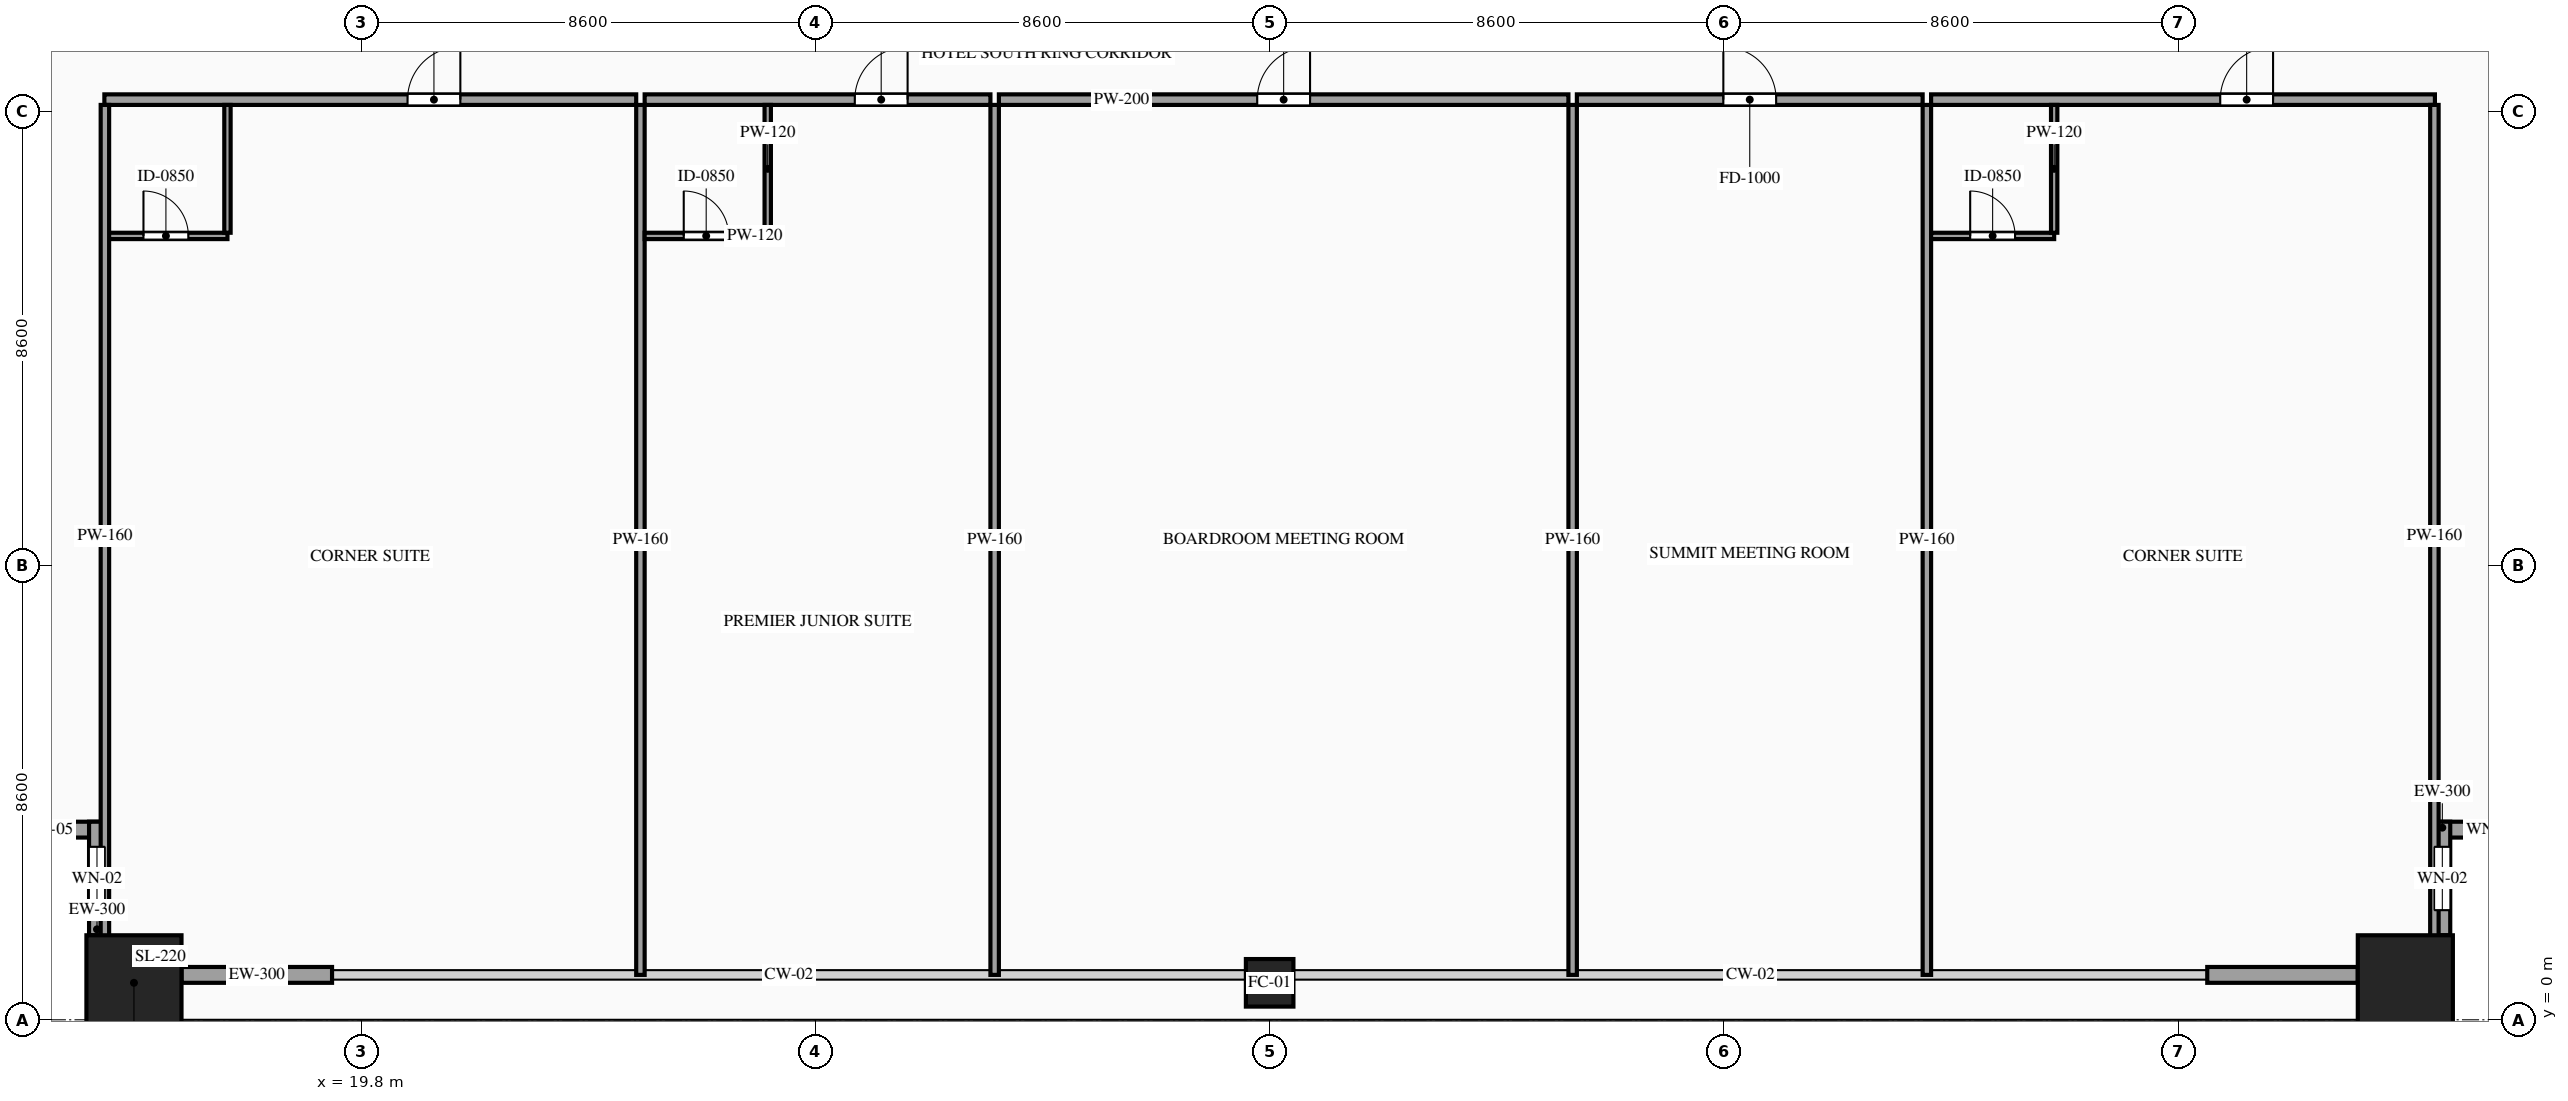
"""IFC4 building model, lengths in metres.
Left out: names, types, materials, properties, quantities, classifications, styles, units other than length and angle.
Written with IfcOpenShell. Run it as: python <this file> out.ifc"""

import sys

from ifc_helpers import new_model, si_unit, direction, frame, frame_2d, origin, origin_2d, place, context, subcontext, project, spatial, rectangle, hollow_rectangle, extrude, source, transform, mapped, element, fill, save


model = new_model("IFC4")
c1 = context("Model", 3, precision=1e-05, world=origin(), true_north=direction((0.0, 1.0)))
c2 = subcontext(c1, "Body", "Model", "MODEL_VIEW")
j1 = project(units=[si_unit("LENGTHUNIT", "METRE"), si_unit("PLANEANGLEUNIT", "RADIAN")], contexts=[c1])
p1 = place(None, origin())
s1 = spatial("IfcSite", under=j1, at=p1, CompositionType="ELEMENT")
p2 = place(p1, origin())
s2 = spatial("IfcBuilding", under=s1, at=p2, CompositionType="ELEMENT")
p3 = place(p2, frame((0.0, 0.0, 53.2)))
s3 = spatial("IfcBuildingStorey", under=s2, at=p3, CompositionType="ELEMENT", Elevation=53.2)
m1 = source(origin(), c2, "Body", "SweptSolid", [
    extrude(hollow_rectangle(XDim=1.8, YDim=1.8, WallThickness=0.08, at=origin_2d()), origin(), (0.0, 0.0, 1.0), 3.6),
])
p4 = place(p3, frame((15.5, 0.7, 0.0), z_axis=(0.0, 0.0, 1.0), x_axis=(1.0, 0.0, 0.0)))
e1 = element("IfcColumn", 1, at=p4, inside=s3, PredefinedType="COLUMN", context=c2, shape_type="MappedRepresentation", body=[
    mapped(m1, transform((0.0, 0.0, 0.0), scale=1.0)),
])
m2 = source(origin(), c2, "Body", "SweptSolid", [
    extrude(hollow_rectangle(XDim=0.9, YDim=0.9, WallThickness=0.042, at=origin_2d()), origin(), (0.0, 0.0, 1.0), 3.6),
])
p5 = place(p3, frame((37.0, 0.7, 0.0), z_axis=(0.0, 0.0, 1.0), x_axis=(1.0, 0.0, 0.0)))
e2 = element("IfcColumn", 2, at=p5, inside=s3, PredefinedType="COLUMN", context=c2, shape_type="MappedRepresentation", body=[
    mapped(m2, transform((0.0, 0.0, 0.0), scale=1.0)),
])
p6 = place(p3, frame((58.5, 0.7, 0.0), z_axis=(0.0, 0.0, 1.0), x_axis=(1.0, 0.0, 0.0)))
e3 = element("IfcColumn", 3, at=p6, inside=s3, PredefinedType="COLUMN", context=c2, shape_type="MappedRepresentation", body=[
    mapped(m1, transform((0.0, 0.0, 0.0), scale=1.0)),
])
p7 = place(p3, frame((12.8, 3.6, 0.0), z_axis=(0.0, 0.0, 1.0), x_axis=(1.0, 0.0, 0.0)))
e4 = element("IfcWall", 4, at=p7, inside=s3, PredefinedType="SOLIDWALL", context=c2, shape_type="SweptSolid", body=[
    extrude(rectangle(XDim=2.15, YDim=0.3, at=frame_2d((1.075, 0.0))), origin(), (0.0, 0.0, 1.0), 3.38),
])
p8 = place(p7, frame((0.625, 0.0, 0.85)))
e5 = element("IfcOpeningElement", 5, at=p8, cuts=e4, PredefinedType="OPENING", context=c2, shape_type="SweptSolid", body=[
    extrude(rectangle(XDim=0.9, YDim=1.5, at=frame_2d((0.45, 0.75))), frame((0.0, 0.165, 0.0), z_axis=(0.0, -1.0, 0.0), x_axis=(1.0, 0.0, 0.0)), (0.0, 0.0, 1.0), 0.33),
])
p9 = place(p3, frame((14.8, 3.75, 0.0), z_axis=(0.0, 0.0, 1.0), x_axis=(0.0, -1.0, 0.0)))
e6 = element("IfcWall", 6, at=p9, inside=s3, PredefinedType="SOLIDWALL", context=c2, shape_type="SweptSolid", body=[
    extrude(rectangle(XDim=2.15, YDim=0.3, at=frame_2d((1.075, 0.0))), origin(), (0.0, 0.0, 1.0), 3.38),
])
p10 = place(p9, frame((0.475, 0.0, 0.85)))
e7 = element("IfcOpeningElement", 7, at=p10, cuts=e6, PredefinedType="OPENING", context=c2, shape_type="SweptSolid", body=[
    extrude(rectangle(XDim=1.2, YDim=2.1, at=frame_2d((0.6, 1.05))), frame((0.0, 0.165, 0.0), z_axis=(0.0, -1.0, 0.0), x_axis=(1.0, 0.0, 0.0)), (0.0, 0.0, 1.0), 0.33),
])
p11 = place(p3, frame((59.05, 3.6, 0.0), z_axis=(0.0, 0.0, 1.0), x_axis=(1.0, 0.0, 0.0)))
e8 = element("IfcWall", 8, at=p11, inside=s3, PredefinedType="SOLIDWALL", context=c2, shape_type="SweptSolid", body=[
    extrude(rectangle(XDim=2.15, YDim=0.3, at=frame_2d((1.075, 0.0))), origin(), (0.0, 0.0, 1.0), 3.38),
])
p12 = place(p11, frame((0.625, 0.0, 0.85)))
e9 = element("IfcOpeningElement", 9, at=p12, cuts=e8, PredefinedType="OPENING", context=c2, shape_type="SweptSolid", body=[
    extrude(rectangle(XDim=0.9, YDim=1.5, at=frame_2d((0.45, 0.75))), frame((0.0, 0.165, 0.0), z_axis=(0.0, -1.0, 0.0), x_axis=(1.0, 0.0, 0.0)), (0.0, 0.0, 1.0), 0.33),
])
p13 = place(p3, frame((59.2, 1.6, 0.0), z_axis=(0.0, 0.0, 1.0), x_axis=(0.0, 1.0, 0.0)))
e10 = element("IfcWall", 10, at=p13, inside=s3, PredefinedType="SOLIDWALL", context=c2, shape_type="SweptSolid", body=[
    extrude(rectangle(XDim=2.15, YDim=0.3, at=frame_2d((1.075, 0.0))), origin(), (0.0, 0.0, 1.0), 3.38),
])
p14 = place(p13, frame((0.475, 0.0, 0.85)))
e11 = element("IfcOpeningElement", 11, at=p14, cuts=e10, PredefinedType="OPENING", context=c2, shape_type="SweptSolid", body=[
    extrude(rectangle(XDim=1.2, YDim=2.1, at=frame_2d((0.6, 1.05))), frame((0.0, 0.165, 0.0), z_axis=(0.0, -1.0, 0.0), x_axis=(1.0, 0.0, 0.0)), (0.0, 0.0, 1.0), 0.33),
])
m3 = source(origin(), c2, "Body", "SweptSolid", [
    extrude(rectangle(XDim=2.85, YDim=0.3, at=frame_2d((1.425, 0.0))), origin(), (0.0, 0.0, 1.0), 2.775),
])
for number, where, z_axis, x_axis in (
    (12, (16.4, 0.85, 0.0), (0.0, 0.0, 1.0), (1.0, 0.0, 0.0)),
    (13, (54.75, 0.85, 0.0), (0.0, 0.0, 1.0), (1.0, 0.0, 0.0)),
):
    element("IfcWall", number, at=place(p3, frame(where, z_axis=z_axis, x_axis=x_axis)), inside=s3, PredefinedType="SOLIDWALL", context=c2, shape_type="MappedRepresentation", body=[
        mapped(m3, transform((0.0, 0.0, 0.0), scale=1.0)),
    ])
p15 = place(p3, frame((14.94, 17.42, 0.0), z_axis=(0.0, 0.0, 1.0), x_axis=(1.0, 0.0, 0.0)))
e14 = element("IfcWall", 14, at=p15, inside=s3, PredefinedType="PARTITIONING", context=c2, shape_type="SweptSolid", body=[
    extrude(rectangle(XDim=10.068, YDim=0.2, at=frame_2d((5.034, 0.0))), origin(), (0.0, 0.0, 1.0), 3.38),
])
p16 = place(p15, frame((5.739, 0.0, 0.0)))
e15 = element("IfcOpeningElement", 15, at=p16, cuts=e14, PredefinedType="OPENING", context=c2, shape_type="SweptSolid", body=[
    extrude(rectangle(XDim=1.0, YDim=2.2, at=frame_2d((0.5, 1.1))), frame((0.0, 0.115, 0.0), z_axis=(0.0, -1.0, 0.0), x_axis=(1.0, 0.0, 0.0)), (0.0, 0.0, 1.0), 0.23),
])
m4 = source(origin(), c2, "Body", "SweptSolid", [
    extrude(rectangle(XDim=16.47, YDim=0.16, at=frame_2d((8.235, 0.0))), origin(), (0.0, 0.0, 1.0), 3.38),
])
p17 = place(p3, frame((25.088, 0.85, 0.0), z_axis=(0.0, 0.0, 1.0), x_axis=(0.0, 1.0, 0.0)))
e16 = element("IfcWall", 16, at=p17, inside=s3, PredefinedType="PARTITIONING", context=c2, shape_type="MappedRepresentation", body=[
    mapped(m4, transform((0.0, 0.0, 0.0), scale=1.0)),
])
p18 = place(p3, frame((14.94, 14.84, 0.0), z_axis=(0.0, 0.0, 1.0), x_axis=(1.0, 0.0, 0.0)))
e17 = element("IfcWall", 17, at=p18, inside=s3, PredefinedType="PARTITIONING", context=c2, shape_type="SweptSolid", body=[
    extrude(rectangle(XDim=2.33, YDim=0.12, at=frame_2d((1.165, 0.0))), origin(), (0.0, 0.0, 1.0), 3.38),
])
p19 = place(p18, frame((0.74, 0.0, 0.0)))
e18 = element("IfcOpeningElement", 18, at=p19, cuts=e17, PredefinedType="OPENING", context=c2, shape_type="SweptSolid", body=[
    extrude(rectangle(XDim=0.85, YDim=2.1, at=frame_2d((0.425, 1.05))), frame((0.0, 0.075, 0.0), z_axis=(0.0, -1.0, 0.0), x_axis=(1.0, 0.0, 0.0)), (0.0, 0.0, 1.0), 0.15),
])
m5 = source(origin(), c2, "Body", "SweptSolid", [
    extrude(rectangle(XDim=2.42, YDim=0.12, at=frame_2d((1.21, 0.0))), origin(), (0.0, 0.0, 1.0), 3.38),
])
p20 = place(p3, frame((17.27, 14.9, 0.0), z_axis=(0.0, 0.0, 1.0), x_axis=(0.0, 1.0, 0.0)))
e19 = element("IfcWall", 19, at=p20, inside=s3, PredefinedType="PARTITIONING", context=c2, shape_type="MappedRepresentation", body=[
    mapped(m5, transform((0.0, 0.0, 0.0), scale=1.0)),
])
p21 = place(p3, frame((25.168, 17.42, 0.0), z_axis=(0.0, 0.0, 1.0), x_axis=(1.0, 0.0, 0.0)))
e20 = element("IfcWall", 20, at=p21, inside=s3, PredefinedType="PARTITIONING", context=c2, shape_type="SweptSolid", body=[
    extrude(rectangle(XDim=6.546, YDim=0.2, at=frame_2d((3.273, 0.0))), origin(), (0.0, 0.0, 1.0), 3.38),
])
p22 = place(p21, frame((3.978, 0.0, 0.0)))
e21 = element("IfcOpeningElement", 21, at=p22, cuts=e20, PredefinedType="OPENING", context=c2, shape_type="SweptSolid", body=[
    extrude(rectangle(XDim=1.0, YDim=2.2, at=frame_2d((0.5, 1.1))), frame((0.0, 0.115, 0.0), z_axis=(0.0, -1.0, 0.0), x_axis=(1.0, 0.0, 0.0)), (0.0, 0.0, 1.0), 0.23),
])
p23 = place(p3, frame((31.794, 0.85, 0.0), z_axis=(0.0, 0.0, 1.0), x_axis=(0.0, 1.0, 0.0)))
e22 = element("IfcWall", 22, at=p23, inside=s3, PredefinedType="PARTITIONING", context=c2, shape_type="MappedRepresentation", body=[
    mapped(m4, transform((0.0, 0.0, 0.0), scale=1.0)),
])
p24 = place(p3, frame((25.168, 14.84, 0.0), z_axis=(0.0, 0.0, 1.0), x_axis=(1.0, 0.0, 0.0)))
e23 = element("IfcWall", 23, at=p24, inside=s3, PredefinedType="PARTITIONING", context=c2, shape_type="SweptSolid", body=[
    extrude(rectangle(XDim=2.33, YDim=0.12, at=frame_2d((1.165, 0.0))), origin(), (0.0, 0.0, 1.0), 3.38),
])
p25 = place(p24, frame((0.74, 0.0, 0.0)))
e24 = element("IfcOpeningElement", 24, at=p25, cuts=e23, PredefinedType="OPENING", context=c2, shape_type="SweptSolid", body=[
    extrude(rectangle(XDim=0.85, YDim=2.1, at=frame_2d((0.425, 1.05))), frame((0.0, 0.075, 0.0), z_axis=(0.0, -1.0, 0.0), x_axis=(1.0, 0.0, 0.0)), (0.0, 0.0, 1.0), 0.15),
])
p26 = place(p3, frame((27.498, 14.9, 0.0), z_axis=(0.0, 0.0, 1.0), x_axis=(0.0, 1.0, 0.0)))
e25 = element("IfcWall", 25, at=p26, inside=s3, PredefinedType="PARTITIONING", context=c2, shape_type="MappedRepresentation", body=[
    mapped(m5, transform((0.0, 0.0, 0.0), scale=1.0)),
])
p27 = place(p3, frame((31.874, 17.42, 0.0), z_axis=(0.0, 0.0, 1.0), x_axis=(1.0, 0.0, 0.0)))
e26 = element("IfcWall", 26, at=p27, inside=s3, PredefinedType="PARTITIONING", context=c2, shape_type="SweptSolid", body=[
    extrude(rectangle(XDim=10.782, YDim=0.2, at=frame_2d((5.391, 0.0))), origin(), (0.0, 0.0, 1.0), 3.38),
])
p28 = place(p27, frame((4.891, 0.0, 0.0)))
e27 = element("IfcOpeningElement", 27, at=p28, cuts=e26, PredefinedType="OPENING", context=c2, shape_type="SweptSolid", body=[
    extrude(rectangle(XDim=1.0, YDim=2.2, at=frame_2d((0.5, 1.1))), frame((0.0, 0.115, 0.0), z_axis=(0.0, -1.0, 0.0), x_axis=(1.0, 0.0, 0.0)), (0.0, 0.0, 1.0), 0.23),
])
p29 = place(p3, frame((42.736, 0.85, 0.0), z_axis=(0.0, 0.0, 1.0), x_axis=(0.0, 1.0, 0.0)))
e28 = element("IfcWall", 28, at=p29, inside=s3, PredefinedType="PARTITIONING", context=c2, shape_type="MappedRepresentation", body=[
    mapped(m4, transform((0.0, 0.0, 0.0), scale=1.0)),
])
p30 = place(p3, frame((42.816, 17.42, 0.0), z_axis=(0.0, 0.0, 1.0), x_axis=(1.0, 0.0, 0.0)))
e29 = element("IfcWall", 29, at=p30, inside=s3, PredefinedType="PARTITIONING", context=c2, shape_type="SweptSolid", body=[
    extrude(rectangle(XDim=6.546, YDim=0.2, at=frame_2d((3.273, 0.0))), origin(), (0.0, 0.0, 1.0), 3.38),
])
p31 = place(p30, frame((2.773, 0.0, 0.0)))
e30 = element("IfcOpeningElement", 30, at=p31, cuts=e29, PredefinedType="OPENING", context=c2, shape_type="SweptSolid", body=[
    extrude(rectangle(XDim=1.0, YDim=2.2, at=frame_2d((0.5, 1.1))), frame((0.0, 0.115, 0.0), z_axis=(0.0, -1.0, 0.0), x_axis=(1.0, 0.0, 0.0)), (0.0, 0.0, 1.0), 0.23),
])
p32 = place(p3, frame((49.442, 0.85, 0.0), z_axis=(0.0, 0.0, 1.0), x_axis=(0.0, 1.0, 0.0)))
e31 = element("IfcWall", 31, at=p32, inside=s3, PredefinedType="PARTITIONING", context=c2, shape_type="MappedRepresentation", body=[
    mapped(m4, transform((0.0, 0.0, 0.0), scale=1.0)),
])
p33 = place(p3, frame((49.522, 17.42, 0.0), z_axis=(0.0, 0.0, 1.0), x_axis=(1.0, 0.0, 0.0)))
e32 = element("IfcWall", 32, at=p33, inside=s3, PredefinedType="PARTITIONING", context=c2, shape_type="SweptSolid", body=[
    extrude(rectangle(XDim=9.538, YDim=0.2, at=frame_2d((4.769, 0.0))), origin(), (0.0, 0.0, 1.0), 3.38),
])
p34 = place(p33, frame((5.474, 0.0, 0.0)))
e33 = element("IfcOpeningElement", 33, at=p34, cuts=e32, PredefinedType="OPENING", context=c2, shape_type="SweptSolid", body=[
    extrude(rectangle(XDim=1.0, YDim=2.2, at=frame_2d((0.5, 1.1))), frame((0.0, 0.115, 0.0), z_axis=(0.0, -1.0, 0.0), x_axis=(1.0, 0.0, 0.0)), (0.0, 0.0, 1.0), 0.23),
])
m6 = source(origin(), c2, "Body", "SweptSolid", [
    extrude(rectangle(XDim=16.32, YDim=0.16, at=frame_2d((8.16, 0.0))), origin(), (0.0, 0.0, 1.0), 3.38),
])
for number, where, z_axis, x_axis in (
    (34, (14.95, 1.0, 0.0), (0.0, 0.0, 1.0), (0.0, 1.0, 0.0)),
    (35, (59.05, 1.0, 0.0), (0.0, 0.0, 1.0), (0.0, 1.0, 0.0)),
):
    element("IfcWall", number, at=place(p3, frame(where, z_axis=z_axis, x_axis=x_axis)), inside=s3, PredefinedType="PARTITIONING", context=c2, shape_type="MappedRepresentation", body=[
        mapped(m6, transform((0.0, 0.0, 0.0), scale=1.0)),
    ])
p35 = place(p3, frame((49.522, 14.84, 0.0), z_axis=(0.0, 0.0, 1.0), x_axis=(1.0, 0.0, 0.0)))
e36 = element("IfcWall", 36, at=p35, inside=s3, PredefinedType="PARTITIONING", context=c2, shape_type="SweptSolid", body=[
    extrude(rectangle(XDim=2.33, YDim=0.12, at=frame_2d((1.165, 0.0))), origin(), (0.0, 0.0, 1.0), 3.38),
])
p36 = place(p35, frame((0.74, 0.0, 0.0)))
e37 = element("IfcOpeningElement", 37, at=p36, cuts=e36, PredefinedType="OPENING", context=c2, shape_type="SweptSolid", body=[
    extrude(rectangle(XDim=0.85, YDim=2.1, at=frame_2d((0.425, 1.05))), frame((0.0, 0.075, 0.0), z_axis=(0.0, -1.0, 0.0), x_axis=(1.0, 0.0, 0.0)), (0.0, 0.0, 1.0), 0.15),
])
p37 = place(p3, frame((51.852, 14.9, 0.0), z_axis=(0.0, 0.0, 1.0), x_axis=(0.0, 1.0, 0.0)))
e38 = element("IfcWall", 38, at=p37, inside=s3, PredefinedType="PARTITIONING", context=c2, shape_type="MappedRepresentation", body=[
    mapped(m5, transform((0.0, 0.0, 0.0), scale=1.0)),
])
m7 = source(origin(), c2, "Body", "SweptSolid", [
    extrude(rectangle(XDim=0.9, YDim=1.5, at=frame_2d((0.45, 0.75))), frame((0.0, 0.03, 0.0), z_axis=(0.0, -1.0, 0.0), x_axis=(1.0, 0.0, 0.0)), (0.0, 0.0, 1.0), 0.06),
])
p38 = place(p8, origin())
e39 = element("IfcWindow", 39, at=p38, inside=s3, PartitioningType="SINGLE_PANEL", PredefinedType="WINDOW", context=c2, shape_type="MappedRepresentation", body=[
    mapped(m7, transform((0.0, 0.0, 0.0), scale=1.0)),
])
fill(e5, e39)
m8 = source(origin(), c2, "Body", "SweptSolid", [
    extrude(rectangle(XDim=1.2, YDim=2.1, at=frame_2d((0.6, 1.05))), frame((0.0, 0.03, 0.0), z_axis=(0.0, -1.0, 0.0), x_axis=(1.0, 0.0, 0.0)), (0.0, 0.0, 1.0), 0.06),
])
p39 = place(p10, origin())
e40 = element("IfcWindow", 40, at=p39, inside=s3, PartitioningType="SINGLE_PANEL", PredefinedType="WINDOW", context=c2, shape_type="MappedRepresentation", body=[
    mapped(m8, transform((0.0, 0.0, 0.0), scale=1.0)),
])
fill(e7, e40)
p40 = place(p12, origin())
e41 = element("IfcWindow", 41, at=p40, inside=s3, PartitioningType="SINGLE_PANEL", PredefinedType="WINDOW", context=c2, shape_type="MappedRepresentation", body=[
    mapped(m7, transform((0.0, 0.0, 0.0), scale=1.0)),
])
fill(e9, e41)
p41 = place(p14, origin())
e42 = element("IfcWindow", 42, at=p41, inside=s3, PartitioningType="SINGLE_PANEL", PredefinedType="WINDOW", context=c2, shape_type="MappedRepresentation", body=[
    mapped(m8, transform((0.0, 0.0, 0.0), scale=1.0)),
])
fill(e11, e42)
m9 = source(origin(), c2, "Body", "SweptSolid", [
    extrude(rectangle(XDim=1.0, YDim=2.2, at=frame_2d((0.5, 1.1))), frame((0.0, 0.025, 0.0), z_axis=(0.0, -1.0, 0.0), x_axis=(1.0, 0.0, 0.0)), (0.0, 0.0, 1.0), 0.05),
])
p42 = place(p16, origin())
e43 = element("IfcDoor", 43, at=p42, inside=s3, OperationType="SINGLE_SWING_RIGHT", PredefinedType="DOOR", context=c2, shape_type="MappedRepresentation", body=[
    mapped(m9, transform((0.0, 0.0, 0.0), scale=1.0)),
])
fill(e15, e43)
m10 = source(origin(), c2, "Body", "SweptSolid", [
    extrude(rectangle(XDim=0.85, YDim=2.1, at=frame_2d((0.425, 1.05))), frame((0.0, 0.025, 0.0), z_axis=(0.0, -1.0, 0.0), x_axis=(1.0, 0.0, 0.0)), (0.0, 0.0, 1.0), 0.05),
])
p43 = place(p19, origin())
e44 = element("IfcDoor", 44, at=p43, inside=s3, OperationType="SINGLE_SWING_LEFT", PredefinedType="DOOR", context=c2, shape_type="MappedRepresentation", body=[
    mapped(m10, transform((0.0, 0.0, 0.0), scale=1.0)),
])
fill(e18, e44)
p44 = place(p22, origin())
e45 = element("IfcDoor", 45, at=p44, inside=s3, OperationType="SINGLE_SWING_RIGHT", PredefinedType="DOOR", context=c2, shape_type="MappedRepresentation", body=[
    mapped(m9, transform((0.0, 0.0, 0.0), scale=1.0)),
])
fill(e21, e45)
p45 = place(p25, origin())
e46 = element("IfcDoor", 46, at=p45, inside=s3, OperationType="SINGLE_SWING_LEFT", PredefinedType="DOOR", context=c2, shape_type="MappedRepresentation", body=[
    mapped(m10, transform((0.0, 0.0, 0.0), scale=1.0)),
])
fill(e24, e46)
p46 = place(p28, origin())
e47 = element("IfcDoor", 47, at=p46, inside=s3, OperationType="SINGLE_SWING_RIGHT", PredefinedType="DOOR", context=c2, shape_type="MappedRepresentation", body=[
    mapped(m9, transform((0.0, 0.0, 0.0), scale=1.0)),
])
fill(e27, e47)
p47 = place(p31, origin())
e48 = element("IfcDoor", 48, at=p47, inside=s3, OperationType="SINGLE_SWING_LEFT", PredefinedType="DOOR", context=c2, shape_type="MappedRepresentation", body=[
    mapped(m9, transform((0.0, 0.0, 0.0), scale=1.0)),
])
fill(e30, e48)
p48 = place(p34, origin())
e49 = element("IfcDoor", 49, at=p48, inside=s3, OperationType="SINGLE_SWING_RIGHT", PredefinedType="DOOR", context=c2, shape_type="MappedRepresentation", body=[
    mapped(m9, transform((0.0, 0.0, 0.0), scale=1.0)),
])
fill(e33, e49)
p49 = place(p36, origin())
e50 = element("IfcDoor", 50, at=p49, inside=s3, OperationType="SINGLE_SWING_LEFT", PredefinedType="DOOR", context=c2, shape_type="MappedRepresentation", body=[
    mapped(m10, transform((0.0, 0.0, 0.0), scale=1.0)),
])
fill(e37, e50)
save(model, sys.argv[1])
